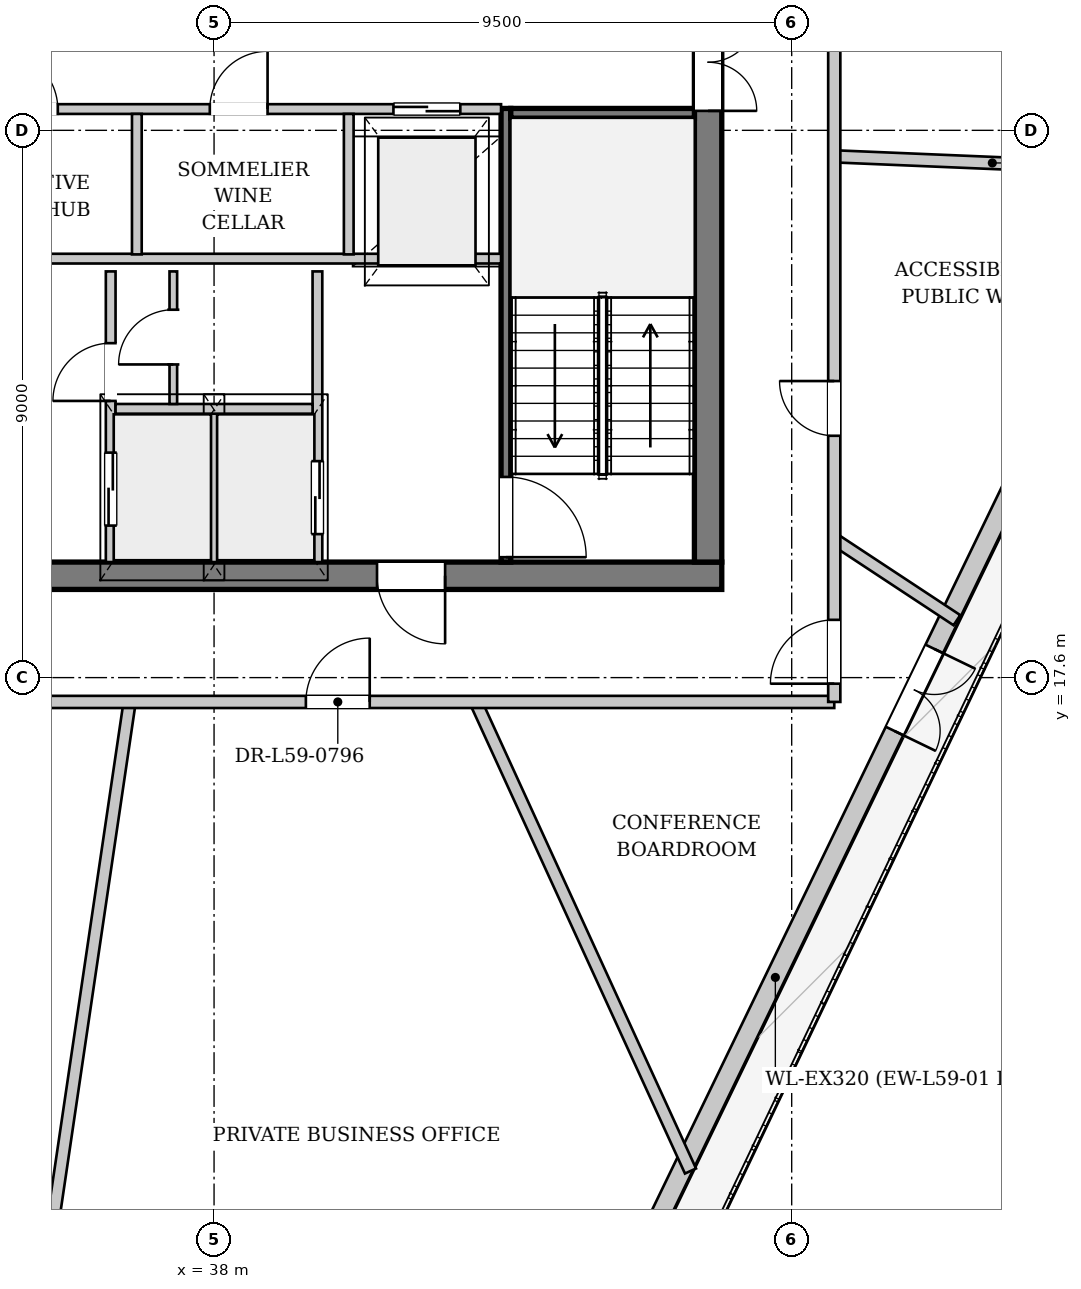
"""IFC4 building model, lengths in metres.
Left out: names, types, materials, properties, quantities, classifications, styles, units other than length and angle.
Written with IfcOpenShell. Run it as: python <this file> out.ifc"""

import sys

from ifc_helpers import new_model, si_unit, direction, frame, frame_2d, origin, place, context, subcontext, project, spatial, rectangle, extrude, source, transform, mapped, element, fill, save


model = new_model("IFC4")
c1 = context("Model", 3, precision=1e-05, world=origin(), true_north=direction((0.0, 1.0)))
c2 = subcontext(c1, "Body", "Model", "MODEL_VIEW")
j1 = project(units=[si_unit("LENGTHUNIT", "METRE"), si_unit("PLANEANGLEUNIT", "RADIAN")], contexts=[c1])
p1 = place(None, origin())
s1 = spatial("IfcSite", under=j1, at=p1, CompositionType="ELEMENT")
p2 = place(p1, origin())
s2 = spatial("IfcBuilding", under=s1, at=p2, CompositionType="ELEMENT")
p3 = place(p2, frame((0.0, 0.0, 223.8)))
s3 = spatial("IfcBuildingStorey", under=s2, at=p3, CompositionType="ELEMENT", Elevation=223.8)
p4 = place(p3, frame((52.807, 24.197, 0.0), z_axis=(0.0, 0.0, 1.0), x_axis=(-0.435460131782, -0.900208016865, 0.0)))
e1 = element("IfcWall", 1, at=p4, inside=s3, PredefinedType="SOLIDWALL", context=c2, shape_type="SweptSolid", body=[
    extrude(rectangle(XDim=22.982, YDim=0.32, at=frame_2d((11.491, 0.0))), origin(), (0.0, 0.0, 1.0), 2.822),
])
p5 = place(p4, frame((6.804, 0.0, 0.0)))
e2 = element("IfcOpeningElement", 2, at=p5, cuts=e1, PredefinedType="OPENING", context=c2, shape_type="SweptSolid", body=[
    extrude(rectangle(XDim=1.5, YDim=2.3, at=frame_2d((0.75, 1.15))), frame((0.0, 0.17, 0.0), z_axis=(0.0, -1.0, 0.0), x_axis=(1.0, 0.0, 0.0)), (0.0, 0.0, 1.0), 0.34),
])
p6 = place(p4, frame((17.307, 0.0, 0.352)))
e3 = element("IfcOpeningElement", 3, at=p6, cuts=e1, PredefinedType="OPENING", context=c2, shape_type="SweptSolid", body=[
    extrude(rectangle(XDim=2.6, YDim=2.35, at=frame_2d((1.3, 1.175))), frame((0.0, 0.17, 0.0), z_axis=(0.0, -1.0, 0.0), x_axis=(1.0, 0.0, 0.0)), (0.0, 0.0, 1.0), 0.34),
])
p7 = place(p3, frame((46.35, 19.275, 0.0), z_axis=(0.0, 0.0, 1.0), x_axis=(-1.0, 0.0, 0.0)))
e4 = element("IfcWall", 4, at=p7, inside=s3, PredefinedType="SHEAR", context=c2, shape_type="SweptSolid", body=[
    extrude(rectangle(XDim=16.7, YDim=0.45, at=frame_2d((8.35, 0.0))), origin(), (0.0, 0.0, 1.0), 3.33),
])
p8 = place(p7, frame((4.55, 0.0, 0.0)))
e5 = element("IfcOpeningElement", 5, at=p8, cuts=e4, PredefinedType="OPENING", context=c2, shape_type="SweptSolid", body=[
    extrude(rectangle(XDim=1.12, YDim=2.25, at=frame_2d((0.56, 1.125))), frame((0.0, 0.235, 0.0), z_axis=(0.0, -1.0, 0.0), x_axis=(1.0, 0.0, 0.0)), (0.0, 0.0, 1.0), 0.47),
])
p9 = place(p7, frame((11.05, 0.0, 0.0)))
e6 = element("IfcOpeningElement", 6, at=p9, cuts=e4, PredefinedType="OPENING", context=c2, shape_type="SweptSolid", body=[
    extrude(rectangle(XDim=1.12, YDim=2.25, at=frame_2d((0.56, 1.125))), frame((0.0, 0.235, 0.0), z_axis=(0.0, -1.0, 0.0), x_axis=(1.0, 0.0, 0.0)), (0.0, 0.0, 1.0), 0.47),
])
p10 = place(p3, frame((46.125, 33.7, 0.0), z_axis=(0.0, 0.0, 1.0), x_axis=(0.0, -1.0, 0.0)))
e7 = element("IfcWall", 7, at=p10, inside=s3, PredefinedType="SHEAR", context=c2, shape_type="SweptSolid", body=[
    extrude(rectangle(XDim=14.2, YDim=0.45, at=frame_2d((7.1, 0.0))), origin(), (0.0, 0.0, 1.0), 3.33),
])
p11 = place(p10, frame((5.18, 0.0, 0.0)))
e8 = element("IfcOpeningElement", 8, at=p11, cuts=e7, PredefinedType="OPENING", context=c2, shape_type="SweptSolid", body=[
    extrude(rectangle(XDim=1.6, YDim=2.2, at=frame_2d((0.8, 1.1))), frame((0.0, 0.235, 0.0), z_axis=(0.0, -1.0, 0.0), x_axis=(1.0, 0.0, 0.0)), (0.0, 0.0, 1.0), 0.47),
])
p12 = place(p10, frame((2.05, 0.0, 0.0)))
e9 = element("IfcOpeningElement", 9, at=p12, cuts=e7, PredefinedType="OPENING", context=c2, shape_type="SweptSolid", body=[
    extrude(rectangle(XDim=0.95, YDim=2.1, at=frame_2d((0.475, 1.05))), frame((0.0, 0.235, 0.0), z_axis=(0.0, -1.0, 0.0), x_axis=(1.0, 0.0, 0.0)), (0.0, 0.0, 1.0), 0.47),
])
p13 = place(p3, frame((42.8, 26.96, 0.0), z_axis=(0.0, 0.0, 1.0), x_axis=(0.0, -1.0, 0.0)))
e10 = element("IfcWall", 10, at=p13, inside=s3, PredefinedType="PARTITIONING", context=c2, shape_type="SweptSolid", body=[
    extrude(rectangle(XDim=7.46, YDim=0.16, at=frame_2d((3.73, 0.0))), origin(), (0.0, 0.0, 1.0), 3.33),
])
p14 = place(p13, frame((6.06, 0.0, 0.0)))
e11 = element("IfcOpeningElement", 11, at=p14, cuts=e10, PredefinedType="OPENING", context=c2, shape_type="SweptSolid", body=[
    extrude(rectangle(XDim=1.32, YDim=2.2, at=frame_2d((0.66, 1.1))), frame((0.0, 0.09, 0.0), z_axis=(0.0, -1.0, 0.0), x_axis=(1.0, 0.0, 0.0)), (0.0, 0.0, 1.0), 0.18),
])
p15 = place(p3, frame((42.88, 26.88, 0.0), z_axis=(0.0, 0.0, 1.0), x_axis=(1.0, 0.0, 0.0)))
e12 = element("IfcWall", 12, at=p15, inside=s3, PredefinedType="PARTITIONING", context=c2, shape_type="SweptSolid", body=[
    extrude(rectangle(XDim=3.02, YDim=0.16, at=frame_2d((1.51, 0.0))), origin(), (0.0, 0.0, 1.0), 3.33),
])
p16 = place(p3, frame((36.3, 19.5, 0.0), z_axis=(0.0, 0.0, 1.0), x_axis=(0.0, 1.0, 0.0)))
e13 = element("IfcWall", 13, at=p16, inside=s3, PredefinedType="PARTITIONING", context=c2, shape_type="SweptSolid", body=[
    extrude(rectangle(XDim=4.78, YDim=0.16, at=frame_2d((2.39, 0.0))), origin(), (0.0, 0.0, 1.0), 3.33),
])
p17 = place(p16, frame((0.6, 0.0, 0.0)))
e14 = element("IfcOpeningElement", 14, at=p17, cuts=e13, PredefinedType="OPENING", context=c2, shape_type="SweptSolid", body=[
    extrude(rectangle(XDim=1.2, YDim=2.2, at=frame_2d((0.6, 1.1))), frame((0.0, 0.09, 0.0), z_axis=(0.0, -1.0, 0.0), x_axis=(1.0, 0.0, 0.0)), (0.0, 0.0, 1.0), 0.18),
])
p18 = place(p16, frame((2.65, 0.0, 0.0)))
e15 = element("IfcOpeningElement", 15, at=p18, cuts=e13, PredefinedType="OPENING", context=c2, shape_type="SweptSolid", body=[
    extrude(rectangle(XDim=0.95, YDim=2.1, at=frame_2d((0.475, 1.05))), frame((0.0, 0.09, 0.0), z_axis=(0.0, -1.0, 0.0), x_axis=(1.0, 0.0, 0.0)), (0.0, 0.0, 1.0), 0.18),
])
p19 = place(p3, frame((39.7, 24.28, 0.0), z_axis=(0.0, 0.0, 1.0), x_axis=(0.0, -1.0, 0.0)))
e16 = element("IfcWall", 16, at=p19, inside=s3, PredefinedType="PARTITIONING", context=c2, shape_type="SweptSolid", body=[
    extrude(rectangle(XDim=4.78, YDim=0.16, at=frame_2d((2.39, 0.0))), origin(), (0.0, 0.0, 1.0), 3.33),
])
p20 = place(p19, frame((3.12, 0.0, 0.0)))
e17 = element("IfcOpeningElement", 17, at=p20, cuts=e16, PredefinedType="OPENING", context=c2, shape_type="SweptSolid", body=[
    extrude(rectangle(XDim=1.2, YDim=2.2, at=frame_2d((0.6, 1.1))), frame((0.0, 0.09, 0.0), z_axis=(0.0, -1.0, 0.0), x_axis=(1.0, 0.0, 0.0)), (0.0, 0.0, 1.0), 0.18),
])
p21 = place(p3, frame((38.0, 19.5, 0.0), z_axis=(0.0, 0.0, 1.0), x_axis=(0.0, 1.0, 0.0)))
e18 = element("IfcWall", 18, at=p21, inside=s3, PredefinedType="PARTITIONING", context=c2, shape_type="SweptSolid", body=[
    extrude(rectangle(XDim=2.46, YDim=0.125, at=frame_2d((1.23, 0.0))), origin(), (0.0, 0.0, 1.0), 3.33),
])
p22 = place(p3, frame((36.38, 22.02, 0.0), z_axis=(0.0, 0.0, 1.0), x_axis=(1.0, 0.0, 0.0)))
e19 = element("IfcWall", 19, at=p22, inside=s3, PredefinedType="PARTITIONING", context=c2, shape_type="SweptSolid", body=[
    extrude(rectangle(XDim=3.24, YDim=0.16, at=frame_2d((1.62, 0.0))), origin(), (0.0, 0.0, 1.0), 3.33),
])
p23 = place(p3, frame((33.28, 24.49, 0.0), z_axis=(0.0, 0.0, 1.0), x_axis=(1.0, 0.0, 0.0)))
e20 = element("IfcWall", 20, at=p23, inside=s3, PredefinedType="PARTITIONING", context=c2, shape_type="SweptSolid", body=[
    extrude(rectangle(XDim=9.44, YDim=0.16, at=frame_2d((4.72, 0.0))), origin(), (0.0, 0.0, 1.0), 3.33),
])
p24 = place(p3, frame((37.33, 22.1, 0.0), z_axis=(0.0, 0.0, 1.0), x_axis=(0.0, 1.0, 0.0)))
e21 = element("IfcWall", 21, at=p24, inside=s3, PredefinedType="PARTITIONING", context=c2, shape_type="SweptSolid", body=[
    extrude(rectangle(XDim=2.18, YDim=0.125, at=frame_2d((1.09, 0.0))), origin(), (0.0, 0.0, 1.0), 3.33),
])
p25 = place(p24, frame((0.65, 0.0, 0.0)))
e22 = element("IfcOpeningElement", 22, at=p25, cuts=e21, PredefinedType="OPENING", context=c2, shape_type="SweptSolid", body=[
    extrude(rectangle(XDim=0.9, YDim=2.1, at=frame_2d((0.45, 1.05))), frame((0.0, 0.073, 0.0), z_axis=(0.0, -1.0, 0.0), x_axis=(1.0, 0.0, 0.0)), (0.0, 0.0, 1.0), 0.145),
])
p26 = place(p3, frame((33.28, 26.95, 0.0), z_axis=(0.0, 0.0, 1.0), x_axis=(1.0, 0.0, 0.0)))
e23 = element("IfcWall", 23, at=p26, inside=s3, PredefinedType="PARTITIONING", context=c2, shape_type="SweptSolid", body=[
    extrude(rectangle(XDim=9.44, YDim=0.16, at=frame_2d((4.72, 0.0))), origin(), (0.0, 0.0, 1.0), 3.33),
])
p27 = place(p26, frame((1.2, 0.0, 0.0)))
e24 = element("IfcOpeningElement", 24, at=p27, cuts=e23, PredefinedType="OPENING", context=c2, shape_type="SweptSolid", body=[
    extrude(rectangle(XDim=0.95, YDim=2.1, at=frame_2d((0.475, 1.05))), frame((0.0, 0.09, 0.0), z_axis=(0.0, -1.0, 0.0), x_axis=(1.0, 0.0, 0.0)), (0.0, 0.0, 1.0), 0.18),
])
p28 = place(p26, frame((4.65, 0.0, 0.0)))
e25 = element("IfcOpeningElement", 25, at=p28, cuts=e23, PredefinedType="OPENING", context=c2, shape_type="SweptSolid", body=[
    extrude(rectangle(XDim=0.95, YDim=2.1, at=frame_2d((0.475, 1.05))), frame((0.0, 0.09, 0.0), z_axis=(0.0, -1.0, 0.0), x_axis=(1.0, 0.0, 0.0)), (0.0, 0.0, 1.0), 0.18),
])
p29 = place(p26, frame((7.67, 0.0, 0.0)))
e26 = element("IfcOpeningElement", 26, at=p29, cuts=e23, PredefinedType="OPENING", context=c2, shape_type="SweptSolid", body=[
    extrude(rectangle(XDim=1.1, YDim=2.2, at=frame_2d((0.55, 1.1))), frame((0.0, 0.09, 0.0), z_axis=(0.0, -1.0, 0.0), x_axis=(1.0, 0.0, 0.0)), (0.0, 0.0, 1.0), 0.18),
])
for number, where, z_axis, x_axis in (
    (27, (36.73, 24.56, 0.0), (0.0, 0.0, 1.0), (0.0, 1.0, 0.0)),
    (28, (40.215, 24.56, 0.0), (0.0, 0.0, 1.0), (0.0, 1.0, 0.0)),
):
    element("IfcWall", number, at=place(p3, frame(where, z_axis=z_axis, x_axis=x_axis)), inside=s3, PredefinedType="PARTITIONING", context=c2, shape_type="SweptSolid", body=[
        extrude(rectangle(XDim=2.31, YDim=0.16, at=frame_2d((1.155, 0.0))), origin(), (0.0, 0.0, 1.0), 3.33),
    ])
p30 = place(p3, frame((48.2, 26.173, 0.0), z_axis=(0.0, 0.0, 1.0), x_axis=(0.999121979666, -0.041895939512, 0.0)))
e29 = element("IfcWall", 29, at=p30, inside=s3, PredefinedType="PARTITIONING", context=c2, shape_type="SweptSolid", body=[
    extrude(rectangle(XDim=5.204, YDim=0.2, at=frame_2d((2.602, 0.0))), origin(), (0.0, 0.0, 1.0), 3.33),
])
p31 = place(p3, frame((36.612, 17.2, 0.0), z_axis=(0.0, 0.0, 1.0), x_axis=(-0.146066825949, -0.989274725421, 0.0)))
e30 = element("IfcWall", 30, at=p31, inside=s3, PredefinedType="PARTITIONING", context=c2, shape_type="SweptSolid", body=[
    extrude(rectangle(XDim=11.239, YDim=0.2, at=frame_2d((5.619, 0.0))), origin(), (0.0, 0.0, 1.0), 3.33),
])
p32 = place(p3, frame((42.304, 17.2, 0.0), z_axis=(0.0, 0.0, 1.0), x_axis=(0.416275176363, -0.909238680185, 0.0)))
e31 = element("IfcWall", 31, at=p32, inside=s3, PredefinedType="PARTITIONING", context=c2, shape_type="SweptSolid", body=[
    extrude(rectangle(XDim=8.484, YDim=0.2, at=frame_2d((4.242, 0.0))), origin(), (0.0, 0.0, 1.0), 3.33),
])
p33 = place(p3, frame((48.2, 19.874, 0.0), z_axis=(0.0, 0.0, 1.0), x_axis=(0.834868508207, -0.550449429107, 0.0)))
e32 = element("IfcWall", 32, at=p33, inside=s3, PredefinedType="PARTITIONING", context=c2, shape_type="SweptSolid", body=[
    extrude(rectangle(XDim=2.416, YDim=0.2, at=frame_2d((1.208, 0.0))), origin(), (0.0, 0.0, 1.0), 3.33),
])
p34 = place(p3, frame((27.8, 17.2, 0.0), z_axis=(0.0, 0.0, 1.0), x_axis=(1.0, 0.0, 0.0)))
e33 = element("IfcWall", 33, at=p34, inside=s3, PredefinedType="PARTITIONING", context=c2, shape_type="SweptSolid", body=[
    extrude(rectangle(XDim=20.4, YDim=0.2, at=frame_2d((10.2, 0.0))), origin(), (0.0, 0.0, 1.0), 3.33),
])
p35 = place(p34, frame((4.762, 0.0, 0.0)))
e34 = element("IfcOpeningElement", 34, at=p35, cuts=e33, PredefinedType="OPENING", context=c2, shape_type="SweptSolid", body=[
    extrude(rectangle(XDim=1.05, YDim=2.2, at=frame_2d((0.525, 1.1))), frame((0.0, 0.11, 0.0), z_axis=(0.0, -1.0, 0.0), x_axis=(1.0, 0.0, 0.0)), (0.0, 0.0, 1.0), 0.22),
])
p36 = place(p34, frame((11.71, 0.0, 0.0)))
e35 = element("IfcOpeningElement", 35, at=p36, cuts=e33, PredefinedType="OPENING", context=c2, shape_type="SweptSolid", body=[
    extrude(rectangle(XDim=1.05, YDim=2.2, at=frame_2d((0.525, 1.1))), frame((0.0, 0.11, 0.0), z_axis=(0.0, -1.0, 0.0), x_axis=(1.0, 0.0, 0.0)), (0.0, 0.0, 1.0), 0.22),
])
p37 = place(p3, frame((48.2, 17.2, 0.0), z_axis=(0.0, 0.0, 1.0), x_axis=(0.0, 1.0, 0.0)))
e36 = element("IfcWall", 36, at=p37, inside=s3, PredefinedType="PARTITIONING", context=c2, shape_type="SweptSolid", body=[
    extrude(rectangle(XDim=18.8, YDim=0.2, at=frame_2d((9.4, 0.0))), origin(), (0.0, 0.0, 1.0), 3.015),
])
p38 = place(p37, frame((11.705, 0.0, 0.0)))
e37 = element("IfcOpeningElement", 37, at=p38, cuts=e36, PredefinedType="OPENING", context=c2, shape_type="SweptSolid", body=[
    extrude(rectangle(XDim=1.05, YDim=2.2, at=frame_2d((0.525, 1.1))), frame((0.0, 0.11, 0.0), z_axis=(0.0, -1.0, 0.0), x_axis=(1.0, 0.0, 0.0)), (0.0, 0.0, 1.0), 0.22),
])
p39 = place(p37, frame((17.45, 0.0, 0.0)))
e38 = element("IfcOpeningElement", 38, at=p39, cuts=e36, PredefinedType="OPENING", context=c2, shape_type="SweptSolid", body=[
    extrude(rectangle(XDim=1.05, YDim=2.2, at=frame_2d((0.525, 1.1))), frame((0.0, 0.11, 0.0), z_axis=(0.0, -1.0, 0.0), x_axis=(1.0, 0.0, 0.0)), (0.0, 0.0, 1.0), 0.22),
])
p40 = place(p37, frame((0.3, 0.0, 0.0)))
e39 = element("IfcOpeningElement", 39, at=p40, cuts=e36, PredefinedType="OPENING", context=c2, shape_type="SweptSolid", body=[
    extrude(rectangle(XDim=1.05, YDim=2.2, at=frame_2d((0.525, 1.1))), frame((0.0, 0.11, 0.0), z_axis=(0.0, -1.0, 0.0), x_axis=(1.0, 0.0, 0.0)), (0.0, 0.0, 1.0), 0.22),
])
p41 = place(p37, frame((4.377, 0.0, 0.0)))
e40 = element("IfcOpeningElement", 40, at=p41, cuts=e36, PredefinedType="OPENING", context=c2, shape_type="SweptSolid", body=[
    extrude(rectangle(XDim=0.9, YDim=2.1, at=frame_2d((0.45, 1.05))), frame((0.0, 0.11, 0.0), z_axis=(0.0, -1.0, 0.0), x_axis=(1.0, 0.0, 0.0)), (0.0, 0.0, 1.0), 0.22),
])
m1 = source(origin(), c2, "Body", "SweptSolid", [
    extrude(rectangle(XDim=1.5, YDim=2.3, at=frame_2d((0.75, 1.15))), frame((0.0, 0.025, 0.0), z_axis=(0.0, -1.0, 0.0), x_axis=(1.0, 0.0, 0.0)), (0.0, 0.0, 1.0), 0.05),
])
p42 = place(p5, origin())
e41 = element("IfcDoor", 41, at=p42, inside=s3, OperationType="DOUBLE_DOOR_SINGLE_SWING", PredefinedType="DOOR", context=c2, shape_type="MappedRepresentation", body=[
    mapped(m1, transform((0.0, 0.0, 0.0), x_axis=(1.0, 0.0, 0.0), y_axis=(0.0, 1.0, 0.0), z_axis=(0.0, 0.0, 1.0), scale=1.0)),
])
fill(e2, e41)
m2 = source(origin(), c2, "Body", "SweptSolid", [
    extrude(rectangle(XDim=1.12, YDim=2.25, at=frame_2d((0.56, 1.125))), frame((0.0, 0.025, 0.0), z_axis=(0.0, -1.0, 0.0), x_axis=(1.0, 0.0, 0.0)), (0.0, 0.0, 1.0), 0.05),
])
p43 = place(p8, origin())
e42 = element("IfcDoor", 42, at=p43, inside=s3, OperationType="SINGLE_SWING_LEFT", PredefinedType="DOOR", context=c2, shape_type="MappedRepresentation", body=[
    mapped(m2, transform((0.0, 0.0, 0.0), x_axis=(1.0, 0.0, 0.0), y_axis=(0.0, 1.0, 0.0), z_axis=(0.0, 0.0, 1.0), scale=1.0)),
])
fill(e5, e42)
m3 = source(origin(), c2, "Body", "SweptSolid", [
    extrude(rectangle(XDim=1.6, YDim=2.2, at=frame_2d((0.8, 1.1))), frame((0.0, 0.025, 0.0), z_axis=(0.0, -1.0, 0.0), x_axis=(1.0, 0.0, 0.0)), (0.0, 0.0, 1.0), 0.05),
])
p44 = place(p11, origin())
e43 = element("IfcDoor", 43, at=p44, inside=s3, OperationType="DOUBLE_DOOR_SINGLE_SWING", PredefinedType="DOOR", context=c2, shape_type="MappedRepresentation", body=[
    mapped(m3, transform((0.0, 0.0, 0.0), x_axis=(1.0, 0.0, 0.0), y_axis=(0.0, 1.0, 0.0), z_axis=(0.0, 0.0, 1.0), scale=1.0)),
])
fill(e8, e43)
m4 = source(origin(), c2, "Body", "SweptSolid", [
    extrude(rectangle(XDim=1.32, YDim=2.2, at=frame_2d((0.66, 1.1))), frame((0.0, 0.025, 0.0), z_axis=(0.0, -1.0, 0.0), x_axis=(1.0, 0.0, 0.0)), (0.0, 0.0, 1.0), 0.05),
])
p45 = place(p14, origin())
e44 = element("IfcDoor", 44, at=p45, inside=s3, OperationType="SINGLE_SWING_RIGHT", PredefinedType="DOOR", context=c2, shape_type="MappedRepresentation", body=[
    mapped(m4, transform((0.0, 0.0, 0.0), x_axis=(1.0, 0.0, 0.0), y_axis=(0.0, 1.0, 0.0), z_axis=(0.0, 0.0, 1.0), scale=1.0)),
])
fill(e11, e44)
m5 = source(origin(), c2, "Body", "SweptSolid", [
    extrude(rectangle(XDim=1.2, YDim=2.2, at=frame_2d((0.6, 1.1))), frame((0.0, 0.025, 0.0), z_axis=(0.0, -1.0, 0.0), x_axis=(1.0, 0.0, 0.0)), (0.0, 0.0, 1.0), 0.05),
])
p46 = place(p17, origin())
e45 = element("IfcDoor", 45, at=p46, inside=s3, OperationType="DOUBLE_DOOR_SLIDING", PredefinedType="DOOR", context=c2, shape_type="MappedRepresentation", body=[
    mapped(m5, transform((0.0, 0.0, 0.0), x_axis=(1.0, 0.0, 0.0), y_axis=(0.0, 1.0, 0.0), z_axis=(0.0, 0.0, 1.0), scale=1.0)),
])
fill(e14, e45)
m6 = source(origin(), c2, "Body", "SweptSolid", [
    extrude(rectangle(XDim=0.95, YDim=2.1, at=frame_2d((0.475, 1.05))), frame((0.0, 0.025, 0.0), z_axis=(0.0, -1.0, 0.0), x_axis=(1.0, 0.0, 0.0)), (0.0, 0.0, 1.0), 0.05),
])
p47 = place(p18, origin())
e46 = element("IfcDoor", 46, at=p47, inside=s3, OperationType="SINGLE_SWING_LEFT", PredefinedType="DOOR", context=c2, shape_type="MappedRepresentation", body=[
    mapped(m6, transform((0.0, 0.0, 0.0), x_axis=(1.0, 0.0, 0.0), y_axis=(0.0, 1.0, 0.0), z_axis=(0.0, 0.0, 1.0), scale=1.0)),
])
fill(e15, e46)
m7 = source(origin(), c2, "Body", "SweptSolid", [
    extrude(rectangle(XDim=0.9, YDim=2.1, at=frame_2d((0.45, 1.05))), frame((0.0, 0.025, 0.0), z_axis=(0.0, -1.0, 0.0), x_axis=(1.0, 0.0, 0.0)), (0.0, 0.0, 1.0), 0.05),
])
p48 = place(p25, origin())
e47 = element("IfcDoor", 47, at=p48, inside=s3, OperationType="SINGLE_SWING_LEFT", PredefinedType="DOOR", context=c2, shape_type="MappedRepresentation", body=[
    mapped(m7, transform((0.0, 0.0, 0.0), x_axis=(1.0, 0.0, 0.0), y_axis=(0.0, 1.0, 0.0), z_axis=(0.0, 0.0, 1.0), scale=1.0)),
])
fill(e22, e47)
p49 = place(p20, origin())
e48 = element("IfcDoor", 48, at=p49, inside=s3, OperationType="DOUBLE_DOOR_SLIDING", PredefinedType="DOOR", context=c2, shape_type="MappedRepresentation", body=[
    mapped(m5, transform((0.0, 0.0, 0.0), x_axis=(1.0, 0.0, 0.0), y_axis=(0.0, 1.0, 0.0), z_axis=(0.0, 0.0, 1.0), scale=1.0)),
])
fill(e17, e48)
p50 = place(p27, origin())
e49 = element("IfcDoor", 49, at=p50, inside=s3, OperationType="SINGLE_SWING_LEFT", PredefinedType="DOOR", context=c2, shape_type="MappedRepresentation", body=[
    mapped(m6, transform((0.0, 0.0, 0.0), x_axis=(1.0, 0.0, 0.0), y_axis=(0.0, 1.0, 0.0), z_axis=(0.0, 0.0, 1.0), scale=1.0)),
])
fill(e24, e49)
p51 = place(p28, origin())
e50 = element("IfcDoor", 50, at=p51, inside=s3, OperationType="SINGLE_SWING_RIGHT", PredefinedType="DOOR", context=c2, shape_type="MappedRepresentation", body=[
    mapped(m6, transform((0.0, 0.0, 0.0), x_axis=(1.0, 0.0, 0.0), y_axis=(0.0, 1.0, 0.0), z_axis=(0.0, 0.0, 1.0), scale=1.0)),
])
fill(e25, e50)
m8 = source(origin(), c2, "Body", "SweptSolid", [
    extrude(rectangle(XDim=1.1, YDim=2.2, at=frame_2d((0.55, 1.1))), frame((0.0, 0.025, 0.0), z_axis=(0.0, -1.0, 0.0), x_axis=(1.0, 0.0, 0.0)), (0.0, 0.0, 1.0), 0.05),
])
p52 = place(p29, origin())
e51 = element("IfcDoor", 51, at=p52, inside=s3, OperationType="DOUBLE_DOOR_SLIDING", PredefinedType="DOOR", context=c2, shape_type="MappedRepresentation", body=[
    mapped(m8, transform((0.0, 0.0, 0.0), x_axis=(1.0, 0.0, 0.0), y_axis=(0.0, 1.0, 0.0), z_axis=(0.0, 0.0, 1.0), scale=1.0)),
])
fill(e26, e51)
m9 = source(origin(), c2, "Body", "SweptSolid", [
    extrude(rectangle(XDim=1.05, YDim=2.2, at=frame_2d((0.525, 1.1))), frame((0.0, 0.025, 0.0), z_axis=(0.0, -1.0, 0.0), x_axis=(1.0, 0.0, 0.0)), (0.0, 0.0, 1.0), 0.05),
])
p53 = place(p36, origin())
e52 = element("IfcDoor", 52, at=p53, inside=s3, OperationType="SINGLE_SWING_RIGHT", PredefinedType="DOOR", context=c2, shape_type="MappedRepresentation", body=[
    mapped(m9, transform((0.0, 0.0, 0.0), x_axis=(1.0, 0.0, 0.0), y_axis=(0.0, 1.0, 0.0), z_axis=(0.0, 0.0, 1.0), scale=1.0)),
])
fill(e35, e52)
p54 = place(p40, origin())
e53 = element("IfcDoor", 53, at=p54, inside=s3, OperationType="SINGLE_SWING_LEFT", PredefinedType="DOOR", context=c2, shape_type="MappedRepresentation", body=[
    mapped(m9, transform((0.0, 0.0, 0.0), x_axis=(1.0, 0.0, 0.0), y_axis=(0.0, 1.0, 0.0), z_axis=(0.0, 0.0, 1.0), scale=1.0)),
])
fill(e39, e53)
p55 = place(p41, origin())
e54 = element("IfcDoor", 54, at=p55, inside=s3, OperationType="SINGLE_SWING_RIGHT", PredefinedType="DOOR", context=c2, shape_type="MappedRepresentation", body=[
    mapped(m7, transform((0.0, 0.0, 0.0), x_axis=(1.0, 0.0, 0.0), y_axis=(0.0, 1.0, 0.0), z_axis=(0.0, 0.0, 1.0), scale=1.0)),
])
fill(e40, e54)
save(model, sys.argv[1])
